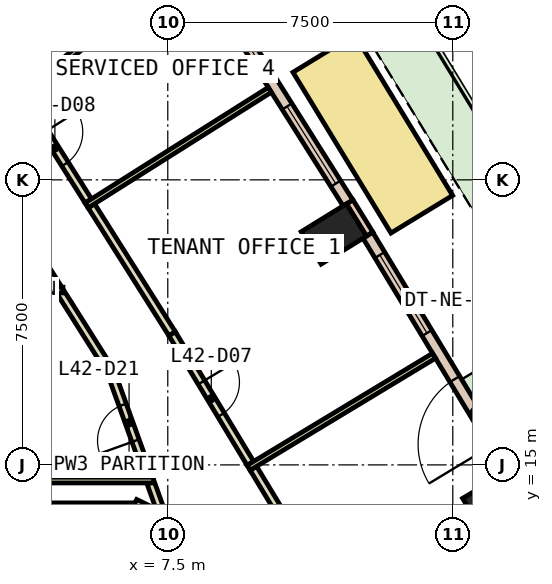
"""IFC4 building model, lengths in metres.
Left out: names, types, materials, properties, quantities, classifications, styles, units other than length and angle.
Written with IfcOpenShell. Run it as: python <this file> out.ifc"""

import sys

from ifc_helpers import new_model, si_unit, direction, frame, frame_2d, origin, origin_2d, place, context, subcontext, project, spatial, polyline, rectangle, outline, extrude, element, fill, save


model = new_model("IFC4")
c1 = context("Model", 3, precision=1e-05, world=origin(), true_north=direction((0.0, 1.0)))
c2 = subcontext(c1, "Body", "Model", "MODEL_VIEW")
j1 = project(units=[si_unit("LENGTHUNIT", "METRE"), si_unit("PLANEANGLEUNIT", "RADIAN")], contexts=[c1])
p1 = place(None, origin())
s1 = spatial("IfcSite", under=j1, at=p1, CompositionType="ELEMENT")
p2 = place(p1, origin())
s2 = spatial("IfcBuilding", under=s1, at=p2, CompositionType="ELEMENT")
p3 = place(p2, frame((0.0, 0.0, 189.8)))
s3 = spatial("IfcBuildingStorey", under=s2, at=p3, CompositionType="ELEMENT", Elevation=189.8)
for number, where, z_axis, x_axis in (
    (1, (16.116, 14.046, 0.0), (0.0, 0.0, 1.0), (-0.509, 0.861, 0.0)),
    (2, (11.869, 21.076, 0.0), (0.0, 0.0, 1.0), (-0.525, 0.851, 0.0)),
):
    element("IfcColumn", number, at=place(p3, frame(where, z_axis=z_axis, x_axis=x_axis)), inside=s3, PredefinedType="COLUMN", context=c2, shape_type="SweptSolid", body=[
        extrude(rectangle(XDim=1.0, YDim=1.4, at=origin_2d()), origin(), (0.0, 0.0, 1.0), 3.8),
    ])
p4 = place(p3, frame((0.0, 0.0, -0.6)))
e3 = element("IfcWall", 3, at=p4, inside=s3, PredefinedType="SHEAR", context=c2, shape_type="SweptSolid", body=[
    extrude(outline(polyline([(6.478, 12.88), (7.084, 13.23), (6.64, 14.0), (6.235, 13.3), (6.478, 12.88)])), origin(), (0.0, 0.0, 1.0), 4.4),
])
p5 = place(p3, frame((0.0, 0.0, -0.6)))
e4 = element("IfcWall", 4, at=p5, inside=s3, PredefinedType="SHEAR", context=c2, shape_type="SweptSolid", body=[
    extrude(outline(polyline([(6.64, 14.0), (-6.64, 14.0), (-6.235, 13.3), (6.235, 13.3), (6.64, 14.0)])), origin(), (0.0, 0.0, 1.0), 4.4),
])
p6 = place(p3, frame((12.813, 21.071, 0.0), z_axis=(0.0, 0.0, 1.0), x_axis=(-0.525648735675, 0.850701714282, 0.0)))
e5 = element("IfcWall", 5, at=p6, inside=s3, PredefinedType="STANDARD", context=c2, shape_type="SweptSolid", body=[
    extrude(rectangle(XDim=1.0, YDim=0.2, at=frame_2d((0.5, 0.0))), origin(), (0.0, 0.0, 1.0), 3.8),
])
p7 = place(p3, frame((16.504, 14.855, 0.0), z_axis=(0.0, 0.0, 1.0), x_axis=(-0.517159962006, 0.855888762456, 0.0)))
e6 = element("IfcWall", 6, at=p7, inside=s3, PredefinedType="STANDARD", context=c2, shape_type="SweptSolid", body=[
    extrude(rectangle(XDim=7.23, YDim=0.3, at=frame_2d((3.615, 0.0))), origin(), (0.0, 0.0, 1.0), 3.8),
])
p8 = place(p7, frame((0.807, 0.0, 0.0)))
e7 = element("IfcOpeningElement", 7, at=p8, cuts=e6, PredefinedType="OPENING", context=c2, shape_type="SweptSolid", body=[
    extrude(rectangle(XDim=2.0, YDim=2.4, at=frame_2d((1.0, 1.2))), frame((0.0, 0.16, 0.0), z_axis=(0.0, -1.0, 0.0), x_axis=(1.0, 0.0, 0.0)), (0.0, 0.0, 1.0), 0.32),
])
p9 = place(p7, frame((4.222, 0.0, 0.9)))
e8 = element("IfcOpeningElement", 8, at=p9, cuts=e6, PredefinedType="OPENING", context=c2, shape_type="SweptSolid", body=[
    extrude(rectangle(XDim=2.4, YDim=2.6, at=frame_2d((1.2, 1.3))), frame((0.0, 0.16, 0.0), z_axis=(0.0, -1.0, 0.0), x_axis=(1.0, 0.0, 0.0)), (0.0, 0.0, 1.0), 0.32),
])
p10 = place(p3, frame((12.241, 21.892, 0.0), z_axis=(0.0, 0.0, 1.0), x_axis=(-0.533680752529, 0.845686025887, 0.0)))
e9 = element("IfcWall", 9, at=p10, inside=s3, PredefinedType="STANDARD", context=c2, shape_type="SweptSolid", body=[
    extrude(rectangle(XDim=7.208, YDim=0.3, at=frame_2d((3.604, 0.0))), origin(), (0.0, 0.0, 1.0), 3.8),
])
p11 = place(p10, frame((0.602, 0.0, 0.9)))
e10 = element("IfcOpeningElement", 10, at=p11, cuts=e9, PredefinedType="OPENING", context=c2, shape_type="SweptSolid", body=[
    extrude(rectangle(XDim=2.4, YDim=2.6, at=frame_2d((1.2, 1.3))), frame((0.0, 0.16, 0.0), z_axis=(0.0, -1.0, 0.0), x_axis=(1.0, 0.0, 0.0)), (0.0, 0.0, 1.0), 0.32),
])
p12 = place(p10, frame((4.206, 0.0, 0.9)))
e11 = element("IfcOpeningElement", 11, at=p12, cuts=e9, PredefinedType="OPENING", context=c2, shape_type="SweptSolid", body=[
    extrude(rectangle(XDim=2.4, YDim=2.6, at=frame_2d((1.2, 1.3))), frame((0.0, 0.16, 0.0), z_axis=(0.0, -1.0, 0.0), x_axis=(1.0, 0.0, 0.0)), (0.0, 0.0, 1.0), 0.32),
])
p13 = place(p3, frame((14.184, 21.595, 0.0), z_axis=(0.0, 0.0, 1.0), x_axis=(-0.520440925316, 0.853897677275, 0.0)))
e12 = element("IfcWall", 12, at=p13, inside=s3, PredefinedType="STANDARD", context=c2, shape_type="SweptSolid", body=[
    extrude(rectangle(XDim=4.954, YDim=1.9, at=frame_2d((2.477, 0.0))), origin(), (0.0, 0.0, 1.0), 0.8),
])
p14 = place(p3, frame((6.64, 14.0, 0.0), z_axis=(0.0, 0.0, 1.0), x_axis=(0.899046412443, -0.437853341055, 0.0)))
e13 = element("IfcWall", 13, at=p14, inside=s3, PredefinedType="PARTITIONING", context=c2, shape_type="SweptSolid", body=[
    extrude(rectangle(XDim=0.523, YDim=0.2, at=frame_2d((0.261, 0.0))), origin(), (0.0, 0.0, 1.0), 3.8),
])
p15 = place(p3, frame((7.401, 13.552, 0.0), z_axis=(0.0, 0.0, 1.0), x_axis=(-0.337944878606, 0.941165904091, 0.0)))
e14 = element("IfcWall", 14, at=p15, inside=s3, PredefinedType="PARTITIONING", context=c2, shape_type="SweptSolid", body=[
    extrude(rectangle(XDim=1.038, YDim=0.2, at=frame_2d((0.519, 0.0))), origin(), (0.0, 0.0, 1.0), 3.8),
])
p16 = place(p3, frame((6.999, 14.671, 0.0), z_axis=(0.0, 0.0, 1.0), x_axis=(-0.338795881304, 0.940859899672, 0.0)))
e15 = element("IfcWall", 15, at=p16, inside=s3, PredefinedType="PARTITIONING", context=c2, shape_type="SweptSolid", body=[
    extrude(rectangle(XDim=3.055, YDim=0.2, at=frame_2d((1.527, 0.0))), origin(), (0.0, 0.0, 1.0), 3.8),
])
p17 = place(p16, frame((1.027, 0.0, 0.0)))
e16 = element("IfcOpeningElement", 16, at=p17, cuts=e15, PredefinedType="OPENING", context=c2, shape_type="SweptSolid", body=[
    extrude(rectangle(XDim=1.0, YDim=2.1, at=frame_2d((0.5, 1.05))), frame((0.0, 0.11, 0.0), z_axis=(0.0, -1.0, 0.0), x_axis=(1.0, 0.0, 0.0)), (0.0, 0.0, 1.0), 0.22),
])
p18 = place(p3, frame((5.945, 17.535, 0.0), z_axis=(0.0, 0.0, 1.0), x_axis=(-0.533581643518, 0.845748561749, 0.0)))
e17 = element("IfcWall", 17, at=p18, inside=s3, PredefinedType="PARTITIONING", context=c2, shape_type="SweptSolid", body=[
    extrude(rectangle(XDim=2.367, YDim=0.2, at=frame_2d((1.184, 0.0))), origin(), (0.0, 0.0, 1.0), 3.8),
])
p19 = place(p3, frame((4.602, 19.663, 0.0), z_axis=(0.0, 0.0, 1.0), x_axis=(-0.533664968846, 0.845695986171, 0.0)))
e18 = element("IfcWall", 18, at=p19, inside=s3, PredefinedType="PARTITIONING", context=c2, shape_type="SweptSolid", body=[
    extrude(rectangle(XDim=4.621, YDim=0.2, at=frame_2d((2.311, 0.0))), origin(), (0.0, 0.0, 1.0), 3.8),
])
p20 = place(p19, frame((1.81, 0.0, 0.0)))
e19 = element("IfcOpeningElement", 19, at=p20, cuts=e18, PredefinedType="OPENING", context=c2, shape_type="SweptSolid", body=[
    extrude(rectangle(XDim=1.0, YDim=2.1, at=frame_2d((0.5, 1.05))), frame((0.0, 0.11, 0.0), z_axis=(0.0, -1.0, 0.0), x_axis=(1.0, 0.0, 0.0)), (0.0, 0.0, 1.0), 0.22),
])
p21 = place(p3, frame((9.752, 14.911, 0.0), z_axis=(0.0, 0.0, 1.0), x_axis=(0.517135291957, -0.855903668535, 0.0)))
e20 = element("IfcWall", 20, at=p21, inside=s3, PredefinedType="PARTITIONING", context=c2, shape_type="SweptSolid", body=[
    extrude(rectangle(XDim=3.982, YDim=0.2, at=frame_2d((1.991, 0.0))), origin(), (0.0, 0.0, 1.0), 3.8),
])
p22 = place(p3, frame((5.489, 21.817, 0.0), z_axis=(0.0, 0.0, 1.0), x_axis=(0.533790022325, -0.845617059943, 0.0)))
e21 = element("IfcWall", 21, at=p22, inside=s3, PredefinedType="PARTITIONING", context=c2, shape_type="SweptSolid", body=[
    extrude(rectangle(XDim=3.983, YDim=0.2, at=frame_2d((1.991, 0.0))), origin(), (0.0, 0.0, 1.0), 3.8),
])
p23 = place(p3, frame((7.615, 18.449, 0.0), z_axis=(0.0, 0.0, 1.0), x_axis=(0.516918251554, -0.856034766356, 0.0)))
e22 = element("IfcWall", 22, at=p23, inside=s3, PredefinedType="PARTITIONING", context=c2, shape_type="SweptSolid", body=[
    extrude(rectangle(XDim=3.983, YDim=0.2, at=frame_2d((1.992, 0.0))), origin(), (0.0, 0.0, 1.0), 3.8),
])
p24 = place(p23, frame((1.492, 0.0, 0.0)))
e23 = element("IfcOpeningElement", 23, at=p24, cuts=e22, PredefinedType="OPENING", context=c2, shape_type="SweptSolid", body=[
    extrude(rectangle(XDim=1.0, YDim=2.1, at=frame_2d((0.5, 1.05))), frame((0.0, 0.11, 0.0), z_axis=(0.0, -1.0, 0.0), x_axis=(1.0, 0.0, 0.0)), (0.0, 0.0, 1.0), 0.22),
])
p25 = place(p3, frame((3.65, 24.731, 0.0), z_axis=(0.0, 0.0, 1.0), x_axis=(0.533756056831, -0.845638499476, 0.0)))
e24 = element("IfcWall", 24, at=p25, inside=s3, PredefinedType="PARTITIONING", context=c2, shape_type="SweptSolid", body=[
    extrude(rectangle(XDim=3.296, YDim=0.2, at=frame_2d((1.648, 0.0))), origin(), (0.0, 0.0, 1.0), 3.8),
])
p26 = place(p25, frame((1.148, 0.0, 0.0)))
e25 = element("IfcOpeningElement", 25, at=p26, cuts=e24, PredefinedType="OPENING", context=c2, shape_type="SweptSolid", body=[
    extrude(rectangle(XDim=1.0, YDim=2.1, at=frame_2d((0.5, 1.05))), frame((0.0, 0.11, 0.0), z_axis=(0.0, -1.0, 0.0), x_axis=(1.0, 0.0, 0.0)), (0.0, 0.0, 1.0), 0.22),
])
p27 = place(p3, frame((7.124, 14.6, 0.0), z_axis=(0.0, 0.0, 1.0), x_axis=(-1.0, 0.0, 0.0)))
e26 = element("IfcWall", 26, at=p27, inside=s3, PredefinedType="PARTITIONING", context=c2, shape_type="SweptSolid", body=[
    extrude(rectangle(XDim=6.724, YDim=0.15, at=frame_2d((3.362, 0.0))), origin(), (0.0, 0.0, 1.0), 3.8),
])
p28 = place(p3, frame((0.4, 19.6, 0.0), z_axis=(0.0, 0.0, 1.0), x_axis=(1.0, 0.0, 0.0)))
e27 = element("IfcWall", 27, at=p28, inside=s3, PredefinedType="PARTITIONING", context=c2, shape_type="SweptSolid", body=[
    extrude(rectangle(XDim=4.342, YDim=0.15, at=frame_2d((2.171, 0.0))), origin(), (0.0, 0.0, 1.0), 3.8),
])
p29 = place(p3, frame((9.628, 14.924, 0.0), z_axis=(0.0, 0.0, 1.0), x_axis=(0.855931736607, 0.517088834021, 0.0)))
e28 = element("IfcWall", 28, at=p29, inside=s3, PredefinedType="PARTITIONING", context=c2, shape_type="SweptSolid", body=[
    extrude(rectangle(XDim=5.699, YDim=0.15, at=frame_2d((2.85, 0.0))), origin(), (0.0, 0.0, 1.0), 3.8),
])
p30 = place(p3, frame((5.364, 21.827, 0.0), z_axis=(0.0, 0.0, 1.0), x_axis=(0.845716787596, 0.533632003517, 0.0)))
e29 = element("IfcWall", 29, at=p30, inside=s3, PredefinedType="PARTITIONING", context=c2, shape_type="SweptSolid", body=[
    extrude(rectangle(XDim=5.7, YDim=0.15, at=frame_2d((2.85, 0.0))), origin(), (0.0, 0.0, 1.0), 3.8),
])
p31 = place(p3, frame((3.586, 24.646, 0.0), z_axis=(0.0, 0.0, 1.0), x_axis=(0.769538645463, 0.638600245176, 0.0)))
e30 = element("IfcWall", 30, at=p31, inside=s3, PredefinedType="PARTITIONING", context=c2, shape_type="SweptSolid", body=[
    extrude(rectangle(XDim=4.43, YDim=0.15, at=frame_2d((2.215, 0.0))), origin(), (0.0, 0.0, 1.0), 3.8),
])
p32 = place(p8, origin())
e31 = element("IfcDoor", 31, at=p32, inside=s3, OperationType="SLIDING_TO_LEFT", PredefinedType="DOOR", context=c2, shape_type="SweptSolid", body=[
    extrude(rectangle(XDim=2.0, YDim=2.4, at=frame_2d((1.0, 1.2))), frame((0.0, 0.025, 0.0), z_axis=(0.0, -1.0, 0.0), x_axis=(1.0, 0.0, 0.0)), (0.0, 0.0, 1.0), 0.05),
])
fill(e7, e31)
p33 = place(p9, origin())
e32 = element("IfcWindow", 32, at=p33, inside=s3, PartitioningType="SINGLE_PANEL", PredefinedType="WINDOW", context=c2, shape_type="SweptSolid", body=[
    extrude(rectangle(XDim=2.4, YDim=2.6, at=frame_2d((1.2, 1.3))), frame((0.0, 0.03, 0.0), z_axis=(0.0, -1.0, 0.0), x_axis=(1.0, 0.0, 0.0)), (0.0, 0.0, 1.0), 0.06),
])
fill(e8, e32)
p34 = place(p11, origin())
e33 = element("IfcWindow", 33, at=p34, inside=s3, PartitioningType="SINGLE_PANEL", PredefinedType="WINDOW", context=c2, shape_type="SweptSolid", body=[
    extrude(rectangle(XDim=2.4, YDim=2.6, at=frame_2d((1.2, 1.3))), frame((0.0, 0.03, 0.0), z_axis=(0.0, -1.0, 0.0), x_axis=(1.0, 0.0, 0.0)), (0.0, 0.0, 1.0), 0.06),
])
fill(e10, e33)
p35 = place(p12, origin())
e34 = element("IfcWindow", 34, at=p35, inside=s3, PartitioningType="SINGLE_PANEL", PredefinedType="WINDOW", context=c2, shape_type="SweptSolid", body=[
    extrude(rectangle(XDim=2.4, YDim=2.6, at=frame_2d((1.2, 1.3))), frame((0.0, 0.03, 0.0), z_axis=(0.0, -1.0, 0.0), x_axis=(1.0, 0.0, 0.0)), (0.0, 0.0, 1.0), 0.06),
])
fill(e11, e34)
p36 = place(p24, origin())
e35 = element("IfcDoor", 35, at=p36, inside=s3, OperationType="SINGLE_SWING_LEFT", PredefinedType="DOOR", context=c2, shape_type="SweptSolid", body=[
    extrude(rectangle(XDim=1.0, YDim=2.1, at=frame_2d((0.5, 1.05))), frame((0.0, 0.025, 0.0), z_axis=(0.0, -1.0, 0.0), x_axis=(1.0, 0.0, 0.0)), (0.0, 0.0, 1.0), 0.05),
])
fill(e23, e35)
p37 = place(p26, origin())
e36 = element("IfcDoor", 36, at=p37, inside=s3, OperationType="SINGLE_SWING_LEFT", PredefinedType="DOOR", context=c2, shape_type="SweptSolid", body=[
    extrude(rectangle(XDim=1.0, YDim=2.1, at=frame_2d((0.5, 1.05))), frame((0.0, 0.025, 0.0), z_axis=(0.0, -1.0, 0.0), x_axis=(1.0, 0.0, 0.0)), (0.0, 0.0, 1.0), 0.05),
])
fill(e25, e36)
p38 = place(p17, origin())
e37 = element("IfcDoor", 37, at=p38, inside=s3, OperationType="SINGLE_SWING_LEFT", PredefinedType="DOOR", context=c2, shape_type="SweptSolid", body=[
    extrude(rectangle(XDim=1.0, YDim=2.1, at=frame_2d((0.5, 1.05))), frame((0.0, 0.025, 0.0), z_axis=(0.0, -1.0, 0.0), x_axis=(1.0, 0.0, 0.0)), (0.0, 0.0, 1.0), 0.05),
])
fill(e16, e37)
save(model, sys.argv[1])
